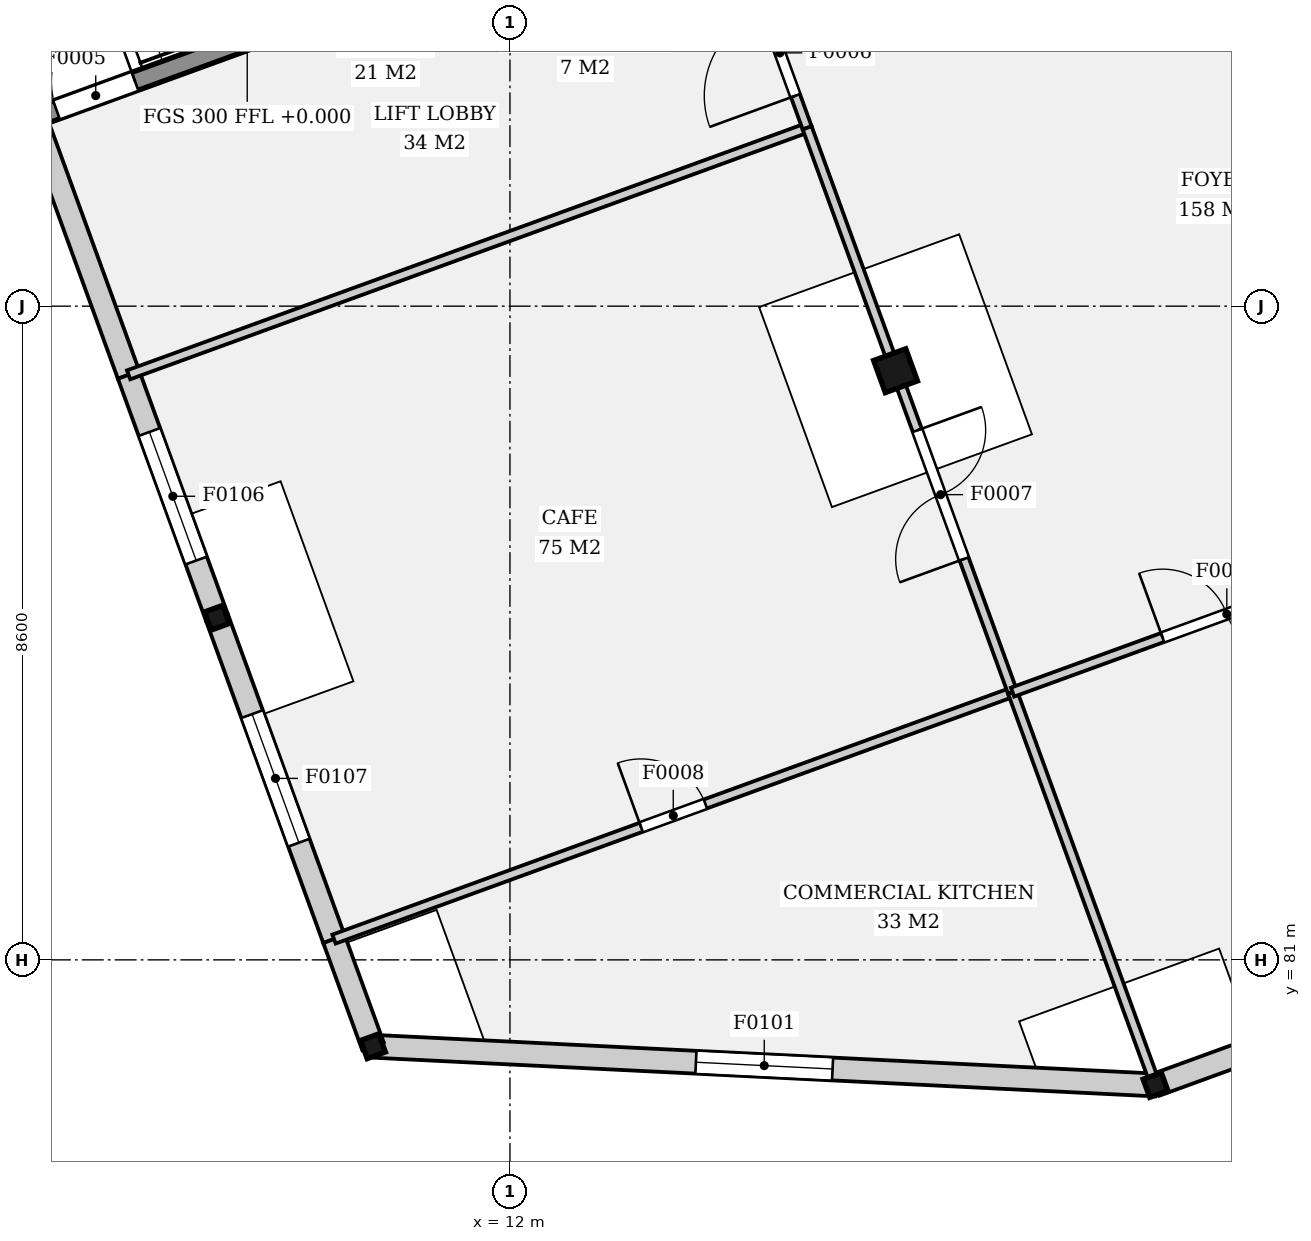
"""IFC4 building model, lengths in metres.
Left out: names, types, materials, properties, quantities, classifications, styles, units other than length and angle.
Written with IfcOpenShell. Run it as: python <this file> out.ifc"""

import sys

from ifc_helpers import new_model, si_unit, direction, frame, frame_2d, origin, origin_2d, place, context, subcontext, project, spatial, rectangle, hollow_rectangle, extrude, element, fill, save


model = new_model("IFC4")
c1 = context("Model", 3, precision=1e-05, world=origin(), true_north=direction((0.0, 1.0)))
c2 = subcontext(c1, "Body", "Model", "MODEL_VIEW")
j1 = project(units=[si_unit("LENGTHUNIT", "METRE"), si_unit("PLANEANGLEUNIT", "RADIAN")], contexts=[c1])
p1 = place(None, origin())
s1 = spatial("IfcSite", under=j1, at=p1, CompositionType="ELEMENT")
p2 = place(p1, origin())
s2 = spatial("IfcBuilding", under=s1, at=p2, CompositionType="ELEMENT")
p3 = place(p2, origin())
s3 = spatial("IfcBuildingStorey", under=s2, at=p3, CompositionType="ELEMENT", Elevation=0.0)
for number, where, z_axis, x_axis in (
    (1, (10.198, 79.864, 0.0), (0.0, 0.0, 1.0), (0.94, 0.342, 0.0)),
    (2, (20.493, 79.354, 0.0), (0.0, 0.0, 1.0), (0.94, 0.342, 0.0)),
    (3, (8.146, 85.502, 0.0), (0.0, 0.0, 1.0), (0.94, 0.342, 0.0)),
):
    element("IfcColumn", number, at=place(p3, frame(where, z_axis=z_axis, x_axis=x_axis)), inside=s3, PredefinedType="COLUMN", context=c2, shape_type="SweptSolid", body=[
        extrude(hollow_rectangle(XDim=0.254, YDim=0.254, WallThickness=0.012, at=origin_2d()), origin(), (0.0, 0.0, 1.0), 5.0),
    ])
p4 = place(p3, frame((17.073, 88.751, 0.0), z_axis=(0.0, 0.0, 1.0), x_axis=(0.939692620786, 0.342020143326, 0.0)))
e4 = element("IfcColumn", 4, at=p4, inside=s3, PredefinedType="COLUMN", context=c2, shape_type="SweptSolid", body=[
    extrude(rectangle(XDim=0.45, YDim=0.45, at=origin_2d()), origin(), (0.0, 0.0, 1.0), 5.0),
])
p5 = place(p3, frame((5.752, 92.08, -1.2), z_axis=(0.0, 0.0, 1.0), x_axis=(0.939697665127, 0.342006283793, 0.0)))
e5 = element("IfcWall", 5, at=p5, inside=s3, PredefinedType="SOLIDWALL", context=c2, shape_type="SweptSolid", body=[
    extrude(rectangle(XDim=7.0, YDim=0.25, at=frame_2d((3.5, 0.0))), origin(), (0.0, 0.0, 1.0), 5.92),
])
p6 = place(p5, frame((0.3, 0.0, 1.2)))
e6 = element("IfcOpeningElement", 6, at=p6, cuts=e5, PredefinedType="OPENING", context=c2, shape_type="SweptSolid", body=[
    extrude(rectangle(XDim=1.1, YDim=2.1, at=frame_2d((0.55, 1.05))), frame((0.0, 0.135, 0.0), z_axis=(0.0, -1.0, 0.0), x_axis=(1.0, 0.0, 0.0)), (0.0, 0.0, 1.0), 0.27),
])
p7 = place(p3, frame((10.198, 79.864, 0.0), z_axis=(0.0, 0.0, 1.0), x_axis=(0.998777549242, -0.049430831779, 0.0)))
e7 = element("IfcWall", 7, at=p7, inside=s3, PredefinedType="ELEMENTEDWALL", context=c2, shape_type="SweptSolid", body=[
    extrude(rectangle(XDim=10.308, YDim=0.3, at=frame_2d((5.154, 0.0))), origin(), (0.0, 0.0, 1.0), 4.303),
])
p8 = place(p7, frame((4.254, 0.0, 0.9)))
e8 = element("IfcOpeningElement", 8, at=p8, cuts=e7, PredefinedType="OPENING", context=c2, shape_type="SweptSolid", body=[
    extrude(rectangle(XDim=1.8, YDim=2.4, at=frame_2d((0.9, 1.2))), frame((0.0, 0.16, 0.0), z_axis=(0.0, -1.0, 0.0), x_axis=(1.0, 0.0, 0.0)), (0.0, 0.0, 1.0), 0.32),
])
p9 = place(p3, frame((20.493, 79.354, 0.0), z_axis=(0.0, 0.0, 1.0), x_axis=(0.939699533273, 0.342001150825, 0.0)))
e9 = element("IfcWall", 9, at=p9, inside=s3, PredefinedType="ELEMENTEDWALL", context=c2, shape_type="SweptSolid", body=[
    extrude(rectangle(XDim=6.0, YDim=0.3, at=frame_2d((3.0, 0.0))), origin(), (0.0, 0.0, 1.0), 4.303),
])
p10 = place(p9, frame((2.1, 0.0, 0.9)))
e10 = element("IfcOpeningElement", 10, at=p10, cuts=e9, PredefinedType="OPENING", context=c2, shape_type="SweptSolid", body=[
    extrude(rectangle(XDim=1.8, YDim=2.4, at=frame_2d((0.9, 1.2))), frame((0.0, 0.16, 0.0), z_axis=(0.0, -1.0, 0.0), x_axis=(1.0, 0.0, 0.0)), (0.0, 0.0, 1.0), 0.32),
])
p11 = place(p3, frame((5.752, 92.08, 0.0), z_axis=(0.0, 0.0, 1.0), x_axis=(0.341988074343, -0.939704292321, 0.0)))
e11 = element("IfcWall", 11, at=p11, inside=s3, PredefinedType="ELEMENTEDWALL", context=c2, shape_type="SweptSolid", body=[
    extrude(rectangle(XDim=3.6, YDim=0.3, at=frame_2d((1.8, 0.0))), origin(), (0.0, 0.0, 1.0), 4.303),
])
p12 = place(p3, frame((6.983, 88.697, 0.0), z_axis=(0.0, 0.0, 1.0), x_axis=(0.342025565686, -0.93969064719, 0.0)))
e12 = element("IfcWall", 12, at=p12, inside=s3, PredefinedType="ELEMENTEDWALL", context=c2, shape_type="SweptSolid", body=[
    extrude(rectangle(XDim=3.4, YDim=0.3, at=frame_2d((1.7, 0.0))), origin(), (0.0, 0.0, 1.0), 4.303),
])
p13 = place(p12, frame((0.8, 0.0, 0.9)))
e13 = element("IfcOpeningElement", 13, at=p13, cuts=e12, PredefinedType="OPENING", context=c2, shape_type="SweptSolid", body=[
    extrude(rectangle(XDim=1.8, YDim=2.4, at=frame_2d((0.9, 1.2))), frame((0.0, 0.16, 0.0), z_axis=(0.0, -1.0, 0.0), x_axis=(1.0, 0.0, 0.0)), (0.0, 0.0, 1.0), 0.32),
])
p14 = place(p3, frame((8.146, 85.502, 0.0), z_axis=(0.0, 0.0, 1.0), x_axis=(0.34200440972, -0.939698347201, 0.0)))
e14 = element("IfcWall", 14, at=p14, inside=s3, PredefinedType="ELEMENTEDWALL", context=c2, shape_type="SweptSolid", body=[
    extrude(rectangle(XDim=4.5, YDim=0.3, at=frame_2d((2.25, 0.0))), origin(), (0.0, 0.0, 1.0), 4.303),
])
p15 = place(p14, frame((1.35, 0.0, 0.9)))
e15 = element("IfcOpeningElement", 15, at=p15, cuts=e14, PredefinedType="OPENING", context=c2, shape_type="SweptSolid", body=[
    extrude(rectangle(XDim=1.8, YDim=2.4, at=frame_2d((0.9, 1.2))), frame((0.0, 0.16, 0.0), z_axis=(0.0, -1.0, 0.0), x_axis=(1.0, 0.0, 0.0)), (0.0, 0.0, 1.0), 0.32),
])
p16 = place(p3, frame((9.685, 81.273, 0.0), z_axis=(0.0, 0.0, 1.0), x_axis=(0.342135098543, -0.939650772545, 0.0)))
e16 = element("IfcWall", 16, at=p16, inside=s3, PredefinedType="ELEMENTEDWALL", context=c2, shape_type="SweptSolid", body=[
    extrude(rectangle(XDim=1.5, YDim=0.3, at=frame_2d((0.75, 0.0))), origin(), (0.0, 0.0, 1.0), 4.303),
])
p17 = place(p3, frame((9.685, 81.273, 0.0), z_axis=(0.0, 0.0, 1.0), x_axis=(0.939692088769, 0.342021605027, 0.0)))
e17 = element("IfcWall", 17, at=p17, inside=s3, PredefinedType="PARTITIONING", context=c2, shape_type="SweptSolid", body=[
    extrude(rectangle(XDim=9.5, YDim=0.125, at=frame_2d((4.75, 0.0))), origin(), (0.0, 0.0, 1.0), 4.187),
])
p18 = place(p17, frame((4.3, 0.0, 0.0)))
e18 = element("IfcOpeningElement", 18, at=p18, cuts=e17, PredefinedType="OPENING", context=c2, shape_type="SweptSolid", body=[
    extrude(rectangle(XDim=0.9, YDim=2.1, at=frame_2d((0.45, 1.05))), frame((0.0, 0.073, 0.0), z_axis=(0.0, -1.0, 0.0), x_axis=(1.0, 0.0, 0.0)), (0.0, 0.0, 1.0), 0.145),
])
p19 = place(p3, frame((6.983, 88.697, 0.0), z_axis=(0.0, 0.0, 1.0), x_axis=(0.939692088769, 0.342021605027, 0.0)))
e19 = element("IfcWall", 19, at=p19, inside=s3, PredefinedType="PARTITIONING", context=c2, shape_type="SweptSolid", body=[
    extrude(rectangle(XDim=9.5, YDim=0.125, at=frame_2d((4.75, 0.0))), origin(), (0.0, 0.0, 1.0), 4.187),
])
p20 = place(p3, frame((20.493, 79.354, 0.0), z_axis=(0.0, 0.0, 1.0), x_axis=(-0.34202461616, 0.939690992795, 0.0)))
e20 = element("IfcWall", 20, at=p20, inside=s3, PredefinedType="PARTITIONING", context=c2, shape_type="SweptSolid", body=[
    extrude(rectangle(XDim=5.5, YDim=0.125, at=frame_2d((2.75, 0.0))), origin(), (0.0, 0.0, 1.0), 4.187),
])
p21 = place(p3, frame((15.91, 91.946, 0.0), z_axis=(0.0, 0.0, 1.0), x_axis=(-0.34206975284, 0.939674562916, 0.0)))
e21 = element("IfcWall", 21, at=p21, inside=s3, PredefinedType="PARTITIONING", context=c2, shape_type="SweptSolid", body=[
    extrude(rectangle(XDim=3.6, YDim=0.125, at=frame_2d((1.8, 0.0))), origin(), (0.0, 0.0, 1.0), 4.187),
])
p22 = place(p21, frame((0.45, 0.0, 0.0)))
e22 = element("IfcOpeningElement", 22, at=p22, cuts=e21, PredefinedType="OPENING", context=c2, shape_type="SweptSolid", body=[
    extrude(rectangle(XDim=1.2, YDim=2.1, at=frame_2d((0.6, 1.05))), frame((0.0, 0.073, 0.0), z_axis=(0.0, -1.0, 0.0), x_axis=(1.0, 0.0, 0.0)), (0.0, 0.0, 1.0), 0.145),
])
p23 = place(p3, frame((18.612, 84.522, 0.0), z_axis=(0.0, 0.0, 1.0), x_axis=(-0.342013514495, 0.939695033456, 0.0)))
e23 = element("IfcWall", 23, at=p23, inside=s3, PredefinedType="PARTITIONING", context=c2, shape_type="SweptSolid", body=[
    extrude(rectangle(XDim=7.9, YDim=0.125, at=frame_2d((3.95, 0.0))), origin(), (0.0, 0.0, 1.0), 4.187),
])
p24 = place(p23, frame((1.865, 0.0, 0.0)))
e24 = element("IfcOpeningElement", 24, at=p24, cuts=e23, PredefinedType="OPENING", context=c2, shape_type="SweptSolid", body=[
    extrude(rectangle(XDim=1.8, YDim=2.1, at=frame_2d((0.9, 1.05))), frame((0.0, 0.073, 0.0), z_axis=(0.0, -1.0, 0.0), x_axis=(1.0, 0.0, 0.0)), (0.0, 0.0, 1.0), 0.145),
])
p25 = place(p3, frame((18.612, 84.522, 0.0), z_axis=(0.0, 0.0, 1.0), x_axis=(0.939699533273, 0.342001150825, 0.0)))
e25 = element("IfcWall", 25, at=p25, inside=s3, PredefinedType="PARTITIONING", context=c2, shape_type="SweptSolid", body=[
    extrude(rectangle(XDim=6.0, YDim=0.125, at=frame_2d((3.0, 0.0))), origin(), (0.0, 0.0, 1.0), 4.187),
])
p26 = place(p25, frame((2.1, 0.0, 0.0)))
e26 = element("IfcOpeningElement", 26, at=p26, cuts=e25, PredefinedType="OPENING", context=c2, shape_type="SweptSolid", body=[
    extrude(rectangle(XDim=1.8, YDim=2.1, at=frame_2d((0.9, 1.05))), frame((0.0, 0.073, 0.0), z_axis=(0.0, -1.0, 0.0), x_axis=(1.0, 0.0, 0.0)), (0.0, 0.0, 1.0), 0.145),
])
p27 = place(p8, origin())
e27 = element("IfcWindow", 27, at=p27, inside=s3, PartitioningType="SINGLE_PANEL", PredefinedType="WINDOW", context=c2, shape_type="SweptSolid", body=[
    extrude(rectangle(XDim=1.8, YDim=2.4, at=frame_2d((0.9, 1.2))), frame((0.0, 0.03, 0.0), z_axis=(0.0, -1.0, 0.0), x_axis=(1.0, 0.0, 0.0)), (0.0, 0.0, 1.0), 0.06),
])
fill(e8, e27)
p28 = place(p13, origin())
e28 = element("IfcWindow", 28, at=p28, inside=s3, PartitioningType="SINGLE_PANEL", PredefinedType="WINDOW", context=c2, shape_type="SweptSolid", body=[
    extrude(rectangle(XDim=1.8, YDim=2.4, at=frame_2d((0.9, 1.2))), frame((0.0, 0.03, 0.0), z_axis=(0.0, -1.0, 0.0), x_axis=(1.0, 0.0, 0.0)), (0.0, 0.0, 1.0), 0.06),
])
fill(e13, e28)
p29 = place(p15, origin())
e29 = element("IfcWindow", 29, at=p29, inside=s3, PartitioningType="SINGLE_PANEL", PredefinedType="WINDOW", context=c2, shape_type="SweptSolid", body=[
    extrude(rectangle(XDim=1.8, YDim=2.4, at=frame_2d((0.9, 1.2))), frame((0.0, 0.03, 0.0), z_axis=(0.0, -1.0, 0.0), x_axis=(1.0, 0.0, 0.0)), (0.0, 0.0, 1.0), 0.06),
])
fill(e15, e29)
p30 = place(p6, origin())
e30 = element("IfcDoor", 30, at=p30, inside=s3, OperationType="SINGLE_SWING_RIGHT", PredefinedType="DOOR", context=c2, shape_type="SweptSolid", body=[
    extrude(rectangle(XDim=1.1, YDim=2.1, at=frame_2d((0.55, 1.05))), frame((0.0, 0.025, 0.0), z_axis=(0.0, -1.0, 0.0), x_axis=(1.0, 0.0, 0.0)), (0.0, 0.0, 1.0), 0.05),
])
fill(e6, e30)
p31 = place(p22, origin())
e31 = element("IfcDoor", 31, at=p31, inside=s3, OperationType="SINGLE_SWING_LEFT", PredefinedType="DOOR", context=c2, shape_type="SweptSolid", body=[
    extrude(rectangle(XDim=1.2, YDim=2.1, at=frame_2d((0.6, 1.05))), frame((0.0, 0.025, 0.0), z_axis=(0.0, -1.0, 0.0), x_axis=(1.0, 0.0, 0.0)), (0.0, 0.0, 1.0), 0.05),
])
fill(e22, e31)
p32 = place(p24, origin())
e32 = element("IfcDoor", 32, at=p32, inside=s3, OperationType="DOUBLE_DOOR_SINGLE_SWING", PredefinedType="DOOR", context=c2, shape_type="SweptSolid", body=[
    extrude(rectangle(XDim=1.8, YDim=2.1, at=frame_2d((0.9, 1.05))), frame((0.0, 0.025, 0.0), z_axis=(0.0, -1.0, 0.0), x_axis=(1.0, 0.0, 0.0)), (0.0, 0.0, 1.0), 0.05),
])
fill(e24, e32)
p33 = place(p18, origin())
e33 = element("IfcDoor", 33, at=p33, inside=s3, OperationType="SINGLE_SWING_LEFT", PredefinedType="DOOR", context=c2, shape_type="SweptSolid", body=[
    extrude(rectangle(XDim=0.9, YDim=2.1, at=frame_2d((0.45, 1.05))), frame((0.0, 0.025, 0.0), z_axis=(0.0, -1.0, 0.0), x_axis=(1.0, 0.0, 0.0)), (0.0, 0.0, 1.0), 0.05),
])
fill(e18, e33)
p34 = place(p26, origin())
e34 = element("IfcDoor", 34, at=p34, inside=s3, OperationType="DOUBLE_DOOR_SINGLE_SWING", PredefinedType="DOOR", context=c2, shape_type="SweptSolid", body=[
    extrude(rectangle(XDim=1.8, YDim=2.1, at=frame_2d((0.9, 1.05))), frame((0.0, 0.025, 0.0), z_axis=(0.0, -1.0, 0.0), x_axis=(1.0, 0.0, 0.0)), (0.0, 0.0, 1.0), 0.05),
])
fill(e26, e34)
save(model, sys.argv[1])
